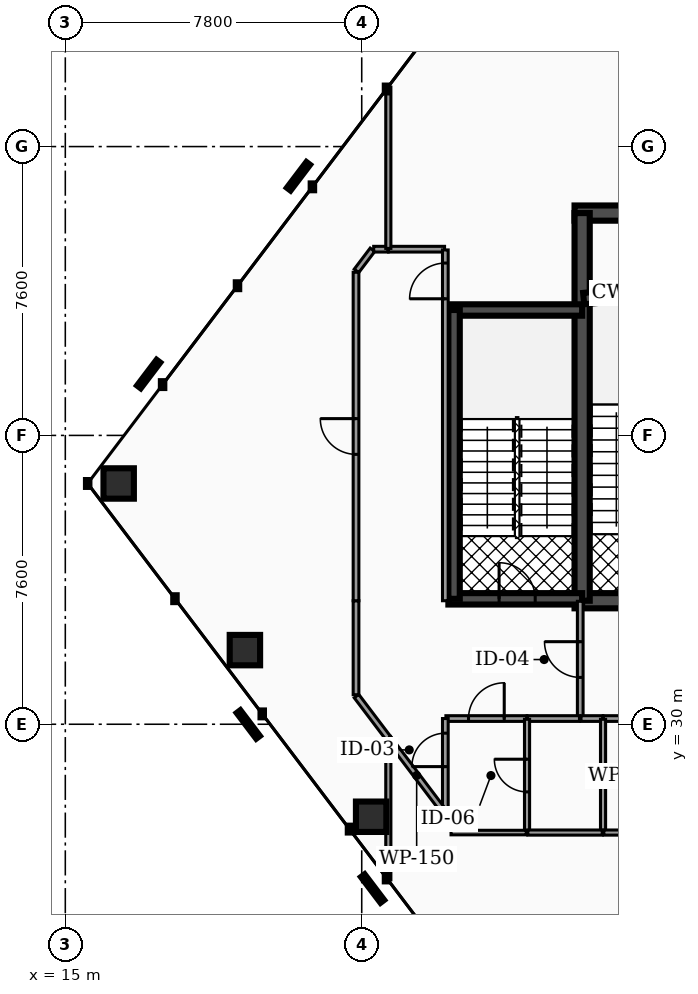
"""IFC4 building model, lengths in metres.
Left out: names, types, materials, properties, quantities, classifications, styles, units other than length and angle.
Written with IfcOpenShell. Run it as: python <this file> out.ifc"""

import sys

from ifc_helpers import new_model, si_unit, direction, frame, frame_2d, origin, origin_2d, place, context, subcontext, project, spatial, rectangle, hollow_rectangle, extrude, element, fill, save


model = new_model("IFC4")
c1 = context("Model", 3, precision=1e-05, world=origin(), true_north=direction((0.0, 1.0)))
c2 = subcontext(c1, "Body", "Model", "MODEL_VIEW")
j1 = project(units=[si_unit("LENGTHUNIT", "METRE"), si_unit("PLANEANGLEUNIT", "RADIAN")], contexts=[c1])
p1 = place(None, origin())
s1 = spatial("IfcSite", under=j1, at=p1, CompositionType="ELEMENT")
p2 = place(p1, origin())
s2 = spatial("IfcBuilding", under=s1, at=p2, CompositionType="ELEMENT")
p3 = place(p2, frame((0.0, 0.0, 119.0)))
s3 = spatial("IfcBuildingStorey", under=s2, at=p3, CompositionType="ELEMENT", Elevation=119.0)
p4 = place(p3, frame((28.4, 43.45, 0.0), z_axis=(0.0, 0.0, 1.0), x_axis=(1.0, 0.0, 0.0)))
e1 = element("IfcWall", 1, at=p4, inside=s3, PredefinedType="SHEAR", context=c2, shape_type="SweptSolid", body=[
    extrude(rectangle(XDim=20.06, YDim=0.4, at=frame_2d((10.03, 0.0))), origin(), (0.0, 0.0, 1.0), 4.18),
])
p5 = place(p3, frame((28.4, 33.25, 0.0), z_axis=(0.0, 0.0, 1.0), x_axis=(1.0, 0.0, 0.0)))
e2 = element("IfcWall", 2, at=p5, inside=s3, PredefinedType="SHEAR", context=c2, shape_type="SweptSolid", body=[
    extrude(rectangle(XDim=20.06, YDim=0.4, at=frame_2d((10.03, 0.0))), origin(), (0.0, 0.0, 1.0), 4.18),
])
p6 = place(p5, frame((4.03, 0.0, 0.0)))
e3 = element("IfcOpeningElement", 3, at=p6, cuts=e2, PredefinedType="OPENING", context=c2, shape_type="SweptSolid", body=[
    extrude(rectangle(XDim=1.1, YDim=2.15, at=frame_2d((0.55, 1.075))), frame((0.0, 0.21, 0.0), z_axis=(0.0, -1.0, 0.0), x_axis=(1.0, 0.0, 0.0)), (0.0, 0.0, 1.0), 0.42),
])
p7 = place(p5, frame((14.87, 0.0, 0.0)))
e4 = element("IfcOpeningElement", 4, at=p7, cuts=e2, PredefinedType="OPENING", context=c2, shape_type="SweptSolid", body=[
    extrude(rectangle(XDim=1.1, YDim=2.15, at=frame_2d((0.55, 1.075))), frame((0.0, 0.21, 0.0), z_axis=(0.0, -1.0, 0.0), x_axis=(1.0, 0.0, 0.0)), (0.0, 0.0, 1.0), 0.42),
])
p8 = place(p5, frame((5.95, 0.0, 0.0)))
e5 = element("IfcOpeningElement", 5, at=p8, cuts=e2, PredefinedType="OPENING", context=c2, shape_type="SweptSolid", body=[
    extrude(rectangle(XDim=1.0, YDim=2.1, at=frame_2d((0.5, 1.05))), frame((0.0, 0.21, 0.0), z_axis=(0.0, -1.0, 0.0), x_axis=(1.0, 0.0, 0.0)), (0.0, 0.0, 1.0), 0.42),
])
p9 = place(p5, frame((7.65, 0.0, 0.0)))
e6 = element("IfcOpeningElement", 6, at=p9, cuts=e2, PredefinedType="OPENING", context=c2, shape_type="SweptSolid", body=[
    extrude(rectangle(XDim=1.0, YDim=2.1, at=frame_2d((0.5, 1.05))), frame((0.0, 0.21, 0.0), z_axis=(0.0, -1.0, 0.0), x_axis=(1.0, 0.0, 0.0)), (0.0, 0.0, 1.0), 0.42),
])
p10 = place(p5, frame((1.31, 0.0, 0.0)))
e7 = element("IfcOpeningElement", 7, at=p10, cuts=e2, PredefinedType="OPENING", context=c2, shape_type="SweptSolid", body=[
    extrude(rectangle(XDim=1.1, YDim=2.2, at=frame_2d((0.55, 1.1))), frame((0.0, 0.21, 0.0), z_axis=(0.0, -1.0, 0.0), x_axis=(1.0, 0.0, 0.0)), (0.0, 0.0, 1.0), 0.42),
])
p11 = place(p5, frame((9.44, 0.0, 0.0)))
e8 = element("IfcOpeningElement", 8, at=p11, cuts=e2, PredefinedType="OPENING", context=c2, shape_type="SweptSolid", body=[
    extrude(rectangle(XDim=1.12, YDim=2.05, at=frame_2d((0.56, 1.025))), frame((0.0, 0.21, 0.0), z_axis=(0.0, -1.0, 0.0), x_axis=(1.0, 0.0, 0.0)), (0.0, 0.0, 1.0), 0.42),
])
p12 = place(p5, frame((17.65, 0.0, 0.0)))
e9 = element("IfcOpeningElement", 9, at=p12, cuts=e2, PredefinedType="OPENING", context=c2, shape_type="SweptSolid", body=[
    extrude(rectangle(XDim=1.1, YDim=2.2, at=frame_2d((0.55, 1.1))), frame((0.0, 0.21, 0.0), z_axis=(0.0, -1.0, 0.0), x_axis=(1.0, 0.0, 0.0)), (0.0, 0.0, 1.0), 0.42),
])
p13 = place(p3, frame((28.6, 33.25, 0.0), z_axis=(0.0, 0.0, 1.0), x_axis=(0.0, 1.0, 0.0)))
e10 = element("IfcWall", 10, at=p13, inside=s3, PredefinedType="SHEAR", context=c2, shape_type="SweptSolid", body=[
    extrude(rectangle(XDim=10.2, YDim=0.4, at=frame_2d((5.1, 0.0))), origin(), (0.0, 0.0, 1.0), 4.18),
])
p14 = place(p3, frame((28.64, 41.2, 0.0), z_axis=(0.0, 0.0, 1.0), x_axis=(0.995687118776, 0.092774789157, 0.0)))
e11 = element("IfcWall", 11, at=p14, inside=s3, PredefinedType="SHEAR", context=c2, shape_type="SweptSolid", body=[
    extrude(rectangle(XDim=3.234, YDim=0.3, at=frame_2d((1.617, 0.0))), origin(), (0.0, 0.0, 1.0), 4.18),
])
p15 = place(p3, frame((25.08, 40.9, 0.0), z_axis=(0.0, 0.0, 1.0), x_axis=(1.0, 0.0, 0.0)))
e12 = element("IfcWall", 12, at=p15, inside=s3, PredefinedType="SHEAR", context=c2, shape_type="SweptSolid", body=[
    extrude(rectangle(XDim=3.52, YDim=0.3, at=frame_2d((1.76, 0.0))), origin(), (0.0, 0.0, 1.0), 4.18),
])
p16 = place(p3, frame((25.08, 33.3, 0.0), z_axis=(0.0, 0.0, 1.0), x_axis=(1.0, 0.0, 0.0)))
e13 = element("IfcWall", 13, at=p16, inside=s3, PredefinedType="SHEAR", context=c2, shape_type="SweptSolid", body=[
    extrude(rectangle(XDim=3.52, YDim=0.3, at=frame_2d((1.76, 0.0))), origin(), (0.0, 0.0, 1.0), 4.18),
])
p17 = place(p16, frame((1.335, 0.0, 0.0)))
e14 = element("IfcOpeningElement", 14, at=p17, cuts=e13, PredefinedType="OPENING", context=c2, shape_type="SweptSolid", body=[
    extrude(rectangle(XDim=0.95, YDim=2.2, at=frame_2d((0.475, 1.1))), frame((0.0, 0.16, 0.0), z_axis=(0.0, -1.0, 0.0), x_axis=(1.0, 0.0, 0.0)), (0.0, 0.0, 1.0), 0.32),
])
p18 = place(p3, frame((25.23, 33.3, 0.0), z_axis=(0.0, 0.0, 1.0), x_axis=(0.0, 1.0, 0.0)))
e15 = element("IfcWall", 15, at=p18, inside=s3, PredefinedType="SHEAR", context=c2, shape_type="SweptSolid", body=[
    extrude(rectangle(XDim=7.6, YDim=0.3, at=frame_2d((3.8, 0.0))), origin(), (0.0, 0.0, 1.0), 4.18),
])
p19 = place(p3, frame((16.404, 36.335, 0.0), z_axis=(-0.016544754326, 0.070082181176, 0.997404009911), x_axis=(-0.973247140066, -0.229760754596, 0.0)))
e16 = element("IfcColumn", 16, at=p19, inside=s3, PredefinedType="COLUMN", context=c2, shape_type="SweptSolid", body=[
    extrude(hollow_rectangle(XDim=0.8, YDim=0.8, WallThickness=0.04, at=origin_2d()), origin(), (0.0, 0.0, 1.0), 4.191),
])
p20 = place(p3, frame((19.726, 31.951, 0.0), z_axis=(0.000350045548, 0.047839558241, 0.998854971523), x_axis=(-0.999973231295, 0.007316877302, 0.0)))
e17 = element("IfcColumn", 17, at=p20, inside=s3, PredefinedType="COLUMN", context=c2, shape_type="SweptSolid", body=[
    extrude(hollow_rectangle(XDim=0.8, YDim=0.8, WallThickness=0.04, at=origin_2d()), origin(), (0.0, 0.0, 1.0), 4.185),
])
p21 = place(p3, frame((23.048, 27.566, 0.0), z_axis=(0.017338888501, 0.02545372184, 0.999525622978), x_axis=(-0.826467889679, 0.56298386063, 0.0)))
e18 = element("IfcColumn", 18, at=p21, inside=s3, PredefinedType="COLUMN", context=c2, shape_type="SweptSolid", body=[
    extrude(hollow_rectangle(XDim=0.8, YDim=0.8, WallThickness=0.04, at=origin_2d()), origin(), (0.0, 0.0, 1.0), 4.182),
])
p22 = place(p3, frame((28.55, 30.17, 0.0), z_axis=(0.0, 0.0, 1.0), x_axis=(0.0, 1.0, 0.0)))
e19 = element("IfcWall", 19, at=p22, inside=s3, PredefinedType="PARTITIONING", context=c2, shape_type="SweptSolid", body=[
    extrude(rectangle(XDim=3.065, YDim=0.15, at=frame_2d((1.533, 0.0))), origin(), (0.0, 0.0, 1.0), 3.137),
])
p23 = place(p22, frame((1.062, 0.0, 0.0)))
e20 = element("IfcOpeningElement", 20, at=p23, cuts=e19, PredefinedType="OPENING", context=c2, shape_type="SweptSolid", body=[
    extrude(rectangle(XDim=0.94, YDim=2.05, at=frame_2d((0.47, 1.025))), frame((0.0, 0.085, 0.0), z_axis=(0.0, -1.0, 0.0), x_axis=(1.0, 0.0, 0.0)), (0.0, 0.0, 1.0), 0.17),
])
p24 = place(p3, frame((28.57, 30.15, 0.0), z_axis=(0.0, 0.0, 1.0), x_axis=(1.0, 0.0, 0.0)))
e21 = element("IfcWall", 21, at=p24, inside=s3, PredefinedType="PARTITIONING", context=c2, shape_type="SweptSolid", body=[
    extrude(rectangle(XDim=0.575, YDim=0.15, at=frame_2d((0.288, 0.0))), origin(), (0.0, 0.0, 1.0), 3.137),
])
p25 = place(p3, frame((29.155, 30.15, 0.0), z_axis=(0.0, 0.0, 1.0), x_axis=(1.0, 0.0, 0.0)))
e22 = element("IfcWall", 22, at=p25, inside=s3, PredefinedType="PARTITIONING", context=c2, shape_type="SweptSolid", body=[
    extrude(rectangle(XDim=1.99, YDim=0.15, at=frame_2d((0.995, 0.0))), origin(), (0.0, 0.0, 1.0), 3.137),
])
p26 = place(p25, frame((0.525, 0.0, 0.0)))
e23 = element("IfcOpeningElement", 23, at=p26, cuts=e22, PredefinedType="OPENING", context=c2, shape_type="SweptSolid", body=[
    extrude(rectangle(XDim=0.94, YDim=2.05, at=frame_2d((0.47, 1.025))), frame((0.0, 0.085, 0.0), z_axis=(0.0, -1.0, 0.0), x_axis=(1.0, 0.0, 0.0)), (0.0, 0.0, 1.0), 0.17),
])
p27 = place(p3, frame((25.015, 30.15, 0.0), z_axis=(0.0, 0.0, 1.0), x_axis=(1.0, 0.0, 0.0)))
e24 = element("IfcWall", 24, at=p27, inside=s3, PredefinedType="PARTITIONING", context=c2, shape_type="SweptSolid", body=[
    extrude(rectangle(XDim=2.13, YDim=0.15, at=frame_2d((1.065, 0.0))), origin(), (0.0, 0.0, 1.0), 3.137),
])
p28 = place(p27, frame((0.595, 0.0, 0.0)))
e25 = element("IfcOpeningElement", 25, at=p28, cuts=e24, PredefinedType="OPENING", context=c2, shape_type="SweptSolid", body=[
    extrude(rectangle(XDim=0.94, YDim=2.05, at=frame_2d((0.47, 1.025))), frame((0.0, 0.085, 0.0), z_axis=(0.0, -1.0, 0.0), x_axis=(1.0, 0.0, 0.0)), (0.0, 0.0, 1.0), 0.17),
])
p29 = place(p3, frame((27.155, 30.15, 0.0), z_axis=(0.0, 0.0, 1.0), x_axis=(1.0, 0.0, 0.0)))
e26 = element("IfcWall", 26, at=p29, inside=s3, PredefinedType="PARTITIONING", context=c2, shape_type="SweptSolid", body=[
    extrude(rectangle(XDim=1.375, YDim=0.15, at=frame_2d((0.688, 0.0))), origin(), (0.0, 0.0, 1.0), 3.137),
])
p30 = place(p3, frame((25.0, 27.675, 0.0), z_axis=(0.0, 0.0, 1.0), x_axis=(0.0, 1.0, 0.0)))
e27 = element("IfcWall", 27, at=p30, inside=s3, PredefinedType="PARTITIONING", context=c2, shape_type="SweptSolid", body=[
    extrude(rectangle(XDim=2.475, YDim=0.15, at=frame_2d((1.237, 0.0))), origin(), (0.0, 0.0, 1.0), 3.137),
])
p31 = place(p30, frame((1.21, 0.0, 0.0)))
e28 = element("IfcOpeningElement", 28, at=p31, cuts=e27, PredefinedType="OPENING", context=c2, shape_type="SweptSolid", body=[
    extrude(rectangle(XDim=0.88, YDim=2.05, at=frame_2d((0.44, 1.025))), frame((0.0, 0.085, 0.0), z_axis=(0.0, -1.0, 0.0), x_axis=(1.0, 0.0, 0.0)), (0.0, 0.0, 1.0), 0.17),
])
p32 = place(p3, frame((23.503, 29.631, 0.0), z_axis=(0.0, 0.0, 1.0), x_axis=(0.603758281428, -0.797167446404, 0.0)))
e29 = element("IfcWall", 29, at=p32, inside=s3, PredefinedType="PARTITIONING", context=c2, shape_type="SweptSolid", body=[
    extrude(rectangle(XDim=2.459, YDim=0.15, at=frame_2d((1.229, 0.0))), origin(), (0.0, 0.0, 1.0), 3.137),
])
p33 = place(p3, frame((22.662, 30.741, 0.0), z_axis=(0.0, 0.0, 1.0), x_axis=(0.603780052094, -0.79715095728, 0.0)))
e30 = element("IfcWall", 30, at=p33, inside=s3, PredefinedType="PARTITIONING", context=c2, shape_type="SweptSolid", body=[
    extrude(rectangle(XDim=1.393, YDim=0.15, at=frame_2d((0.696, 0.0))), origin(), (0.0, 0.0, 1.0), 3.137),
])
p34 = place(p3, frame((22.65, 30.777, 0.0), z_axis=(0.0, 0.0, 1.0), x_axis=(0.0, 1.0, 0.0)))
e31 = element("IfcWall", 31, at=p34, inside=s3, PredefinedType="PARTITIONING", context=c2, shape_type="SweptSolid", body=[
    extrude(rectangle(XDim=2.473, YDim=0.15, at=frame_2d((1.236, 0.0))), origin(), (0.0, 0.0, 1.0), 3.137),
])
p35 = place(p3, frame((22.65, 33.25, 0.0), z_axis=(0.0, 0.0, 1.0), x_axis=(0.0, 1.0, 0.0)))
e32 = element("IfcWall", 32, at=p35, inside=s3, PredefinedType="PARTITIONING", context=c2, shape_type="SweptSolid", body=[
    extrude(rectangle(XDim=8.643, YDim=0.15, at=frame_2d((4.322, 0.0))), origin(), (0.0, 0.0, 1.0), 3.137),
])
p36 = place(p35, frame((3.852, 0.0, 0.0)))
e33 = element("IfcOpeningElement", 33, at=p36, cuts=e32, PredefinedType="OPENING", context=c2, shape_type="SweptSolid", body=[
    extrude(rectangle(XDim=0.94, YDim=2.05, at=frame_2d((0.47, 1.025))), frame((0.0, 0.085, 0.0), z_axis=(0.0, -1.0, 0.0), x_axis=(1.0, 0.0, 0.0)), (0.0, 0.0, 1.0), 0.17),
])
p37 = place(p3, frame((22.662, 41.929, 0.0), z_axis=(0.0, 0.0, 1.0), x_axis=(0.603864439616, 0.797087033245, 0.0)))
e34 = element("IfcWall", 34, at=p37, inside=s3, PredefinedType="PARTITIONING", context=c2, shape_type="SweptSolid", body=[
    extrude(rectangle(XDim=0.696, YDim=0.15, at=frame_2d((0.348, 0.0))), origin(), (0.0, 0.0, 1.0), 3.137),
])
p38 = place(p3, frame((23.115, 42.5, 0.0), z_axis=(0.0, 0.0, 1.0), x_axis=(1.0, 0.0, 0.0)))
e35 = element("IfcWall", 35, at=p38, inside=s3, PredefinedType="PARTITIONING", context=c2, shape_type="SweptSolid", body=[
    extrude(rectangle(XDim=0.381, YDim=0.15, at=frame_2d((0.19, 0.0))), origin(), (0.0, 0.0, 1.0), 3.137),
])
p39 = place(p3, frame((23.505, 42.5, 0.0), z_axis=(0.0, 0.0, 1.0), x_axis=(1.0, 0.0, 0.0)))
e36 = element("IfcWall", 36, at=p39, inside=s3, PredefinedType="PARTITIONING", context=c2, shape_type="SweptSolid", body=[
    extrude(rectangle(XDim=1.475, YDim=0.15, at=frame_2d((0.738, 0.0))), origin(), (0.0, 0.0, 1.0), 3.137),
])
p40 = place(p3, frame((25.0, 33.25, 0.0), z_axis=(0.0, 0.0, 1.0), x_axis=(0.0, 1.0, 0.0)))
e37 = element("IfcWall", 37, at=p40, inside=s3, PredefinedType="PARTITIONING", context=c2, shape_type="SweptSolid", body=[
    extrude(rectangle(XDim=9.23, YDim=0.15, at=frame_2d((4.615, 0.0))), origin(), (0.0, 0.0, 1.0), 3.137),
])
p41 = place(p40, frame((7.945, 0.0, 0.0)))
e38 = element("IfcOpeningElement", 38, at=p41, cuts=e37, PredefinedType="OPENING", context=c2, shape_type="SweptSolid", body=[
    extrude(rectangle(XDim=0.94, YDim=2.05, at=frame_2d((0.47, 1.025))), frame((0.0, 0.085, 0.0), z_axis=(0.0, -1.0, 0.0), x_axis=(1.0, 0.0, 0.0)), (0.0, 0.0, 1.0), 0.17),
])
p42 = place(p3, frame((27.15, 27.17, 0.0), z_axis=(0.0, 0.0, 1.0), x_axis=(0.0, 1.0, 0.0)))
e39 = element("IfcWall", 39, at=p42, inside=s3, PredefinedType="PARTITIONING", context=c2, shape_type="SweptSolid", body=[
    extrude(rectangle(XDim=2.96, YDim=0.135, at=frame_2d((1.48, 0.0))), origin(), (0.0, 0.0, 1.0), 3.137),
])
p43 = place(p42, frame((1.05, 0.0, 0.0)))
e40 = element("IfcOpeningElement", 40, at=p43, cuts=e39, PredefinedType="OPENING", context=c2, shape_type="SweptSolid", body=[
    extrude(rectangle(XDim=0.86, YDim=2.05, at=frame_2d((0.43, 1.025))), frame((0.0, 0.077, 0.0), z_axis=(0.0, -1.0, 0.0), x_axis=(1.0, 0.0, 0.0)), (0.0, 0.0, 1.0), 0.155),
])
p44 = place(p3, frame((25.15, 27.15, 0.0), z_axis=(0.0, 0.0, 1.0), x_axis=(1.0, 0.0, 0.0)))
e41 = element("IfcWall", 41, at=p44, inside=s3, PredefinedType="PARTITIONING", context=c2, shape_type="SweptSolid", body=[
    extrude(rectangle(XDim=1.98, YDim=0.12, at=frame_2d((0.99, 0.0))), origin(), (0.0, 0.0, 1.0), 3.137),
])
p45 = place(p3, frame((29.15, 27.17, 0.0), z_axis=(0.0, 0.0, 1.0), x_axis=(0.0, 1.0, 0.0)))
e42 = element("IfcWall", 42, at=p45, inside=s3, PredefinedType="PARTITIONING", context=c2, shape_type="SweptSolid", body=[
    extrude(rectangle(XDim=2.96, YDim=0.135, at=frame_2d((1.48, 0.0))), origin(), (0.0, 0.0, 1.0), 3.137),
])
for number, where, z_axis, x_axis in (
    (43, (27.17, 27.15, 0.0), (0.0, 0.0, 1.0), (1.0, 0.0, 0.0)),
    (44, (29.17, 27.15, 0.0), (0.0, 0.0, 1.0), (1.0, 0.0, 0.0)),
):
    element("IfcWall", number, at=place(p3, frame(where, z_axis=z_axis, x_axis=x_axis)), inside=s3, PredefinedType="PARTITIONING", context=c2, shape_type="SweptSolid", body=[
        extrude(rectangle(XDim=1.96, YDim=0.135, at=frame_2d((0.98, 0.0))), origin(), (0.0, 0.0, 1.0), 3.137),
    ])
p46 = place(p3, frame((23.5, 25.907, 0.0), z_axis=(0.0, 0.0, 1.0), x_axis=(0.0, 1.0, 0.0)))
e45 = element("IfcWall", 45, at=p46, inside=s3, PredefinedType="PARTITIONING", context=c2, shape_type="SweptSolid", body=[
    extrude(rectangle(XDim=3.708, YDim=0.135, at=frame_2d((1.854, 0.0))), origin(), (0.0, 0.0, 1.0), 3.137),
])
p47 = place(p3, frame((23.5, 42.52, 0.0), z_axis=(0.0, 0.0, 1.0), x_axis=(0.0, 1.0, 0.0)))
e46 = element("IfcWall", 46, at=p47, inside=s3, PredefinedType="PARTITIONING", context=c2, shape_type="SweptSolid", body=[
    extrude(rectangle(XDim=4.243, YDim=0.135, at=frame_2d((2.121, 0.0))), origin(), (0.0, 0.0, 1.0), 3.137),
])
p48 = place(p17, origin())
e47 = element("IfcDoor", 47, at=p48, inside=s3, OperationType="SINGLE_SWING_LEFT", PredefinedType="DOOR", context=c2, shape_type="SweptSolid", body=[
    extrude(rectangle(XDim=0.95, YDim=2.2, at=frame_2d((0.475, 1.1))), frame((0.0, 0.025, 0.0), z_axis=(0.0, -1.0, 0.0), x_axis=(1.0, 0.0, 0.0)), (0.0, 0.0, 1.0), 0.05),
])
fill(e14, e47)
p49 = place(p23, origin())
e48 = element("IfcDoor", 48, at=p49, inside=s3, OperationType="SINGLE_SWING_RIGHT", PredefinedType="DOOR", context=c2, shape_type="SweptSolid", body=[
    extrude(rectangle(XDim=0.94, YDim=2.05, at=frame_2d((0.47, 1.025))), frame((0.0, 0.025, 0.0), z_axis=(0.0, -1.0, 0.0), x_axis=(1.0, 0.0, 0.0)), (0.0, 0.0, 1.0), 0.05),
])
fill(e20, e48)
p50 = place(p28, origin())
e49 = element("IfcDoor", 49, at=p50, inside=s3, OperationType="SINGLE_SWING_RIGHT", PredefinedType="DOOR", context=c2, shape_type="SweptSolid", body=[
    extrude(rectangle(XDim=0.94, YDim=2.05, at=frame_2d((0.47, 1.025))), frame((0.0, 0.025, 0.0), z_axis=(0.0, -1.0, 0.0), x_axis=(1.0, 0.0, 0.0)), (0.0, 0.0, 1.0), 0.05),
])
fill(e25, e49)
p51 = place(p31, origin())
e50 = element("IfcDoor", 50, at=p51, inside=s3, OperationType="SINGLE_SWING_LEFT", PredefinedType="DOOR", context=c2, shape_type="SweptSolid", body=[
    extrude(rectangle(XDim=0.88, YDim=2.05, at=frame_2d((0.44, 1.025))), frame((0.0, 0.025, 0.0), z_axis=(0.0, -1.0, 0.0), x_axis=(1.0, 0.0, 0.0)), (0.0, 0.0, 1.0), 0.05),
])
fill(e28, e50)
p52 = place(p36, origin())
e51 = element("IfcDoor", 51, at=p52, inside=s3, OperationType="SINGLE_SWING_RIGHT", PredefinedType="DOOR", context=c2, shape_type="SweptSolid", body=[
    extrude(rectangle(XDim=0.94, YDim=2.05, at=frame_2d((0.47, 1.025))), frame((0.0, 0.025, 0.0), z_axis=(0.0, -1.0, 0.0), x_axis=(1.0, 0.0, 0.0)), (0.0, 0.0, 1.0), 0.05),
])
fill(e33, e51)
p53 = place(p41, origin())
e52 = element("IfcDoor", 52, at=p53, inside=s3, OperationType="SINGLE_SWING_LEFT", PredefinedType="DOOR", context=c2, shape_type="SweptSolid", body=[
    extrude(rectangle(XDim=0.94, YDim=2.05, at=frame_2d((0.47, 1.025))), frame((0.0, 0.025, 0.0), z_axis=(0.0, -1.0, 0.0), x_axis=(1.0, 0.0, 0.0)), (0.0, 0.0, 1.0), 0.05),
])
fill(e38, e52)
p54 = place(p43, origin())
e53 = element("IfcDoor", 53, at=p54, inside=s3, OperationType="SINGLE_SWING_RIGHT", PredefinedType="DOOR", context=c2, shape_type="SweptSolid", body=[
    extrude(rectangle(XDim=0.86, YDim=2.05, at=frame_2d((0.43, 1.025))), frame((0.0, 0.025, 0.0), z_axis=(0.0, -1.0, 0.0), x_axis=(1.0, 0.0, 0.0)), (0.0, 0.0, 1.0), 0.05),
])
fill(e40, e53)
save(model, sys.argv[1])
